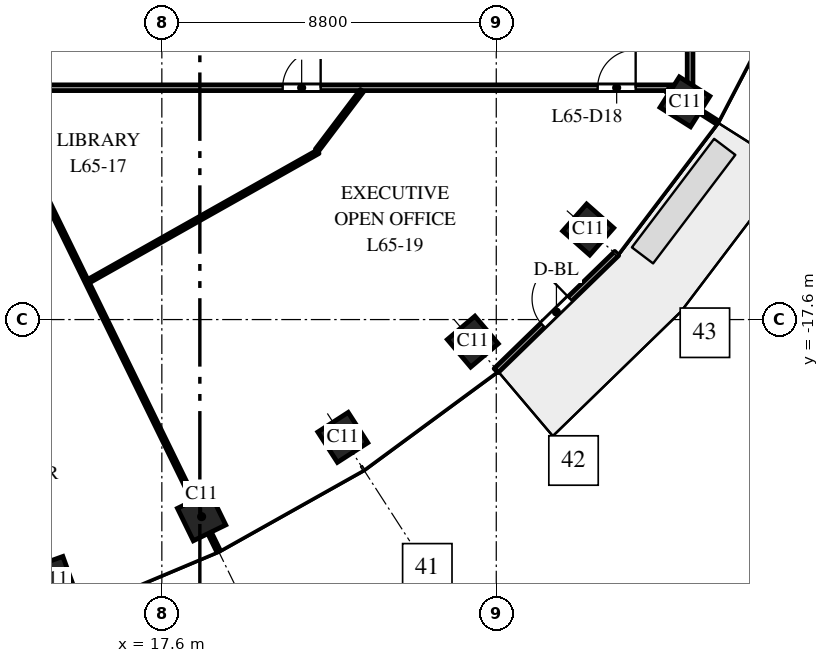
"""IFC4 building model, lengths in metres.
Left out: names, types, materials, properties, quantities, classifications, styles, units other than length and angle.
Written with IfcOpenShell. Run it as: python <this file> out.ifc"""

import sys

from ifc_helpers import new_model, si_unit, direction, frame, frame_2d, origin, origin_2d, place, context, subcontext, project, spatial, rectangle, extrude, element, fill, save


model = new_model("IFC4")
c1 = context("Model", 3, precision=1e-05, world=origin(), true_north=direction((0.0, 1.0)))
c2 = subcontext(c1, "Body", "Model", "MODEL_VIEW")
j1 = project(units=[si_unit("LENGTHUNIT", "METRE"), si_unit("PLANEANGLEUNIT", "RADIAN")], contexts=[c1])
p1 = place(None, origin())
s1 = spatial("IfcSite", under=j1, at=p1, CompositionType="ELEMENT")
p2 = place(p1, origin())
s2 = spatial("IfcBuilding", under=s1, at=p2, CompositionType="ELEMENT")
p3 = place(p2, frame((0.0, 0.0, 303.0)))
s3 = spatial("IfcBuildingStorey", under=s2, at=p3, CompositionType="ELEMENT", Elevation=303.0)
for number, where, z_axis, x_axis in (
    (1, (14.709, -24.441, 0.0), (0.0, 0.0, 1.0), (0.941, 0.338, 0.0)),
    (2, (18.646, -22.785, 0.0), (0.0, 0.0, 1.0), (0.898, 0.439, 0.0)),
    (3, (22.362, -20.7, 0.0), (0.0, 0.0, 1.0), (0.84, 0.542, 0.0)),
    (4, (25.783, -18.18, 0.0), (0.0, 0.0, 1.0), (0.763, 0.646, 0.0)),
    (5, (28.819, -15.23, 0.0), (0.0, 0.0, 1.0), (0.663, 0.749, 0.0)),
    (6, (31.365, -11.871, 0.0), (0.0, 0.0, 1.0), (0.535, 0.845, 0.0)),
):
    element("IfcColumn", number, at=place(p3, frame(where, z_axis=z_axis, x_axis=x_axis)), inside=s3, PredefinedType="COLUMN", context=c2, shape_type="SweptSolid", body=[
        extrude(rectangle(XDim=0.95, YDim=0.95, at=origin_2d()), origin(), (0.0, 0.0, 1.0), 4.0),
    ])
p4 = place(p3, frame((26.396, -18.943, 0.0), z_axis=(0.0, 0.0, 1.0), x_axis=(0.717214761864, 0.696852197647, 0.0)))
e7 = element("IfcWall", 7, at=p4, inside=s3, PredefinedType="STANDARD", context=c2, shape_type="SweptSolid", body=[
    extrude(rectangle(XDim=4.424, YDim=0.15, at=frame_2d((2.212, 0.0))), origin(), (0.0, 0.0, 1.0), 3.7),
])
p5 = place(p4, frame((1.712, 0.0, 0.0)))
e8 = element("IfcOpeningElement", 8, at=p5, cuts=e7, PredefinedType="OPENING", context=c2, shape_type="SweptSolid", body=[
    extrude(rectangle(XDim=1.0, YDim=2.4, at=frame_2d((0.5, 1.2))), frame((0.0, 0.085, 0.0), z_axis=(0.0, -1.0, 0.0), x_axis=(1.0, 0.0, 0.0)), (0.0, 0.0, 1.0), 0.17),
])
p6 = place(p3, frame((1.485, -11.5, 0.0), z_axis=(0.0, 0.0, 1.0), x_axis=(1.0, 0.0, 0.0)))
e9 = element("IfcWall", 9, at=p6, inside=s3, PredefinedType="PARTITIONING", context=c2, shape_type="SweptSolid", body=[
    extrude(rectangle(XDim=30.015, YDim=0.15, at=frame_2d((15.007, 0.0))), origin(), (0.0, 0.0, 1.0), 2.75),
])
p7 = place(p6, frame((10.048, 0.0, 0.0)))
e10 = element("IfcOpeningElement", 10, at=p7, cuts=e9, PredefinedType="OPENING", context=c2, shape_type="SweptSolid", body=[
    extrude(rectangle(XDim=1.0, YDim=2.1, at=frame_2d((0.5, 1.05))), frame((0.0, 0.085, 0.0), z_axis=(0.0, -1.0, 0.0), x_axis=(1.0, 0.0, 0.0)), (0.0, 0.0, 1.0), 0.17),
])
p8 = place(p6, frame((19.294, 0.0, 0.0)))
e11 = element("IfcOpeningElement", 11, at=p8, cuts=e9, PredefinedType="OPENING", context=c2, shape_type="SweptSolid", body=[
    extrude(rectangle(XDim=1.0, YDim=2.1, at=frame_2d((0.5, 1.05))), frame((0.0, 0.085, 0.0), z_axis=(0.0, -1.0, 0.0), x_axis=(1.0, 0.0, 0.0)), (0.0, 0.0, 1.0), 0.17),
])
p9 = place(p6, frame((27.583, 0.0, 0.0)))
e12 = element("IfcOpeningElement", 12, at=p9, cuts=e9, PredefinedType="OPENING", context=c2, shape_type="SweptSolid", body=[
    extrude(rectangle(XDim=1.0, YDim=2.1, at=frame_2d((0.5, 1.05))), frame((0.0, 0.085, 0.0), z_axis=(0.0, -1.0, 0.0), x_axis=(1.0, 0.0, 0.0)), (0.0, 0.0, 1.0), 0.17),
])
p10 = place(p3, frame((13.167, -11.579, 0.0), z_axis=(0.0, 0.0, 1.0), x_axis=(0.439297212097, -0.8983417832, 0.0)))
e13 = element("IfcWall", 13, at=p10, inside=s3, PredefinedType="PARTITIONING", context=c2, shape_type="SweptSolid", body=[
    extrude(rectangle(XDim=13.476, YDim=0.1, at=frame_2d((6.738, 0.0))), origin(), (0.0, 0.0, 1.0), 3.0),
])
p11 = place(p3, frame((15.673, -16.589, 0.0), z_axis=(0.0, 0.0, 1.0), x_axis=(0.871190555515, 0.490945023381, 0.0)))
e14 = element("IfcWall", 14, at=p11, inside=s3, PredefinedType="PARTITIONING", context=c2, shape_type="SweptSolid", body=[
    extrude(rectangle(XDim=6.932, YDim=0.1, at=frame_2d((3.466, 0.0))), origin(), (0.0, 0.0, 1.0), 3.7),
])
p12 = place(p3, frame((21.679, -13.148, 0.0), z_axis=(0.0, 0.0, 1.0), x_axis=(0.602755856466, 0.797925671661, 0.0)))
e15 = element("IfcWall", 15, at=p12, inside=s3, PredefinedType="PARTITIONING", context=c2, shape_type="SweptSolid", body=[
    extrude(rectangle(XDim=1.968, YDim=0.1, at=frame_2d((0.984, 0.0))), origin(), (0.0, 0.0, 1.0), 2.75),
])
p13 = place(p3, frame((30.897, -11.575, 0.0), z_axis=(0.0, 0.0, 1.0), x_axis=(0.844757626245, -0.535149094086, 0.0)))
e16 = element("IfcWall", 16, at=p13, inside=s3, PredefinedType="PARTITIONING", context=c2, shape_type="SweptSolid", body=[
    extrude(rectangle(XDim=1.557, YDim=0.1, at=frame_2d((0.778, 0.0))), origin(), (0.0, 0.0, 1.0), 3.0),
])
p14 = place(p3, frame((31.5, -11.5, 0.0), z_axis=(0.0, 0.0, 1.0), x_axis=(0.0, 1.0, 0.0)))
e17 = element("IfcWall", 17, at=p14, inside=s3, PredefinedType="PARTITIONING", context=c2, shape_type="SweptSolid", body=[
    extrude(rectangle(XDim=3.0, YDim=0.15, at=frame_2d((1.5, 0.0))), origin(), (0.0, 0.0, 1.0), 3.0),
])
p15 = place(p14, frame((1.4, 0.0, 0.0)))
e18 = element("IfcOpeningElement", 18, at=p15, cuts=e17, PredefinedType="OPENING", context=c2, shape_type="SweptSolid", body=[
    extrude(rectangle(XDim=1.0, YDim=2.1, at=frame_2d((0.5, 1.05))), frame((0.0, 0.085, 0.0), z_axis=(0.0, -1.0, 0.0), x_axis=(1.0, 0.0, 0.0)), (0.0, 0.0, 1.0), 0.17),
])
p16 = place(p5, origin())
e19 = element("IfcDoor", 19, at=p16, inside=s3, OperationType="SINGLE_SWING_RIGHT", PredefinedType="DOOR", context=c2, shape_type="SweptSolid", body=[
    extrude(rectangle(XDim=1.0, YDim=2.4, at=frame_2d((0.5, 1.2))), frame((0.0, 0.025, 0.0), z_axis=(0.0, -1.0, 0.0), x_axis=(1.0, 0.0, 0.0)), (0.0, 0.0, 1.0), 0.05),
])
fill(e8, e19)
p17 = place(p8, origin())
e20 = element("IfcDoor", 20, at=p17, inside=s3, OperationType="SINGLE_SWING_RIGHT", PredefinedType="DOOR", context=c2, shape_type="SweptSolid", body=[
    extrude(rectangle(XDim=1.0, YDim=2.1, at=frame_2d((0.5, 1.05))), frame((0.0, 0.025, 0.0), z_axis=(0.0, -1.0, 0.0), x_axis=(1.0, 0.0, 0.0)), (0.0, 0.0, 1.0), 0.05),
])
fill(e11, e20)
p18 = place(p9, origin())
e21 = element("IfcDoor", 21, at=p18, inside=s3, OperationType="SINGLE_SWING_RIGHT", PredefinedType="DOOR", context=c2, shape_type="SweptSolid", body=[
    extrude(rectangle(XDim=1.0, YDim=2.1, at=frame_2d((0.5, 1.05))), frame((0.0, 0.025, 0.0), z_axis=(0.0, -1.0, 0.0), x_axis=(1.0, 0.0, 0.0)), (0.0, 0.0, 1.0), 0.05),
])
fill(e12, e21)
save(model, sys.argv[1])
